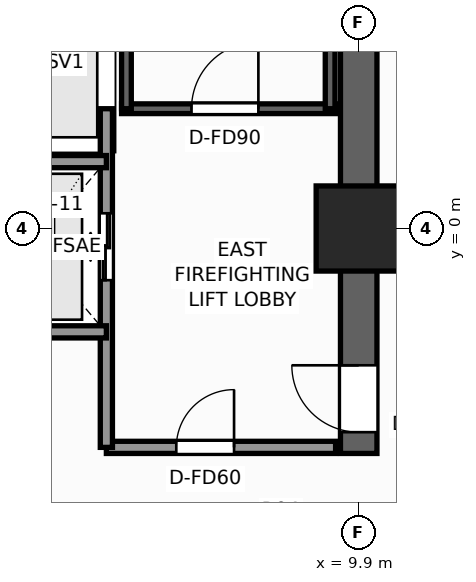
"""IFC4 building model, lengths in metres.
Left out: names, types, materials, properties, quantities, classifications, styles, units other than length and angle.
Written with IfcOpenShell. Run it as: python <this file> out.ifc"""

import sys

from ifc_helpers import new_model, si_unit, direction, frame, frame_2d, origin, origin_2d, place, context, subcontext, project, spatial, rectangle, extrude, element, fill, save


model = new_model("IFC4")
c1 = context("Model", 3, precision=1e-05, world=origin(), true_north=direction((0.0, 1.0)))
c2 = subcontext(c1, "Body", "Model", "MODEL_VIEW")
j1 = project(units=[si_unit("LENGTHUNIT", "METRE"), si_unit("PLANEANGLEUNIT", "RADIAN")], contexts=[c1])
p1 = place(None, origin())
s1 = spatial("IfcSite", under=j1, at=p1, CompositionType="ELEMENT")
p2 = place(p1, origin())
s2 = spatial("IfcBuilding", under=s1, at=p2, CompositionType="ELEMENT")
p3 = place(p2, frame((0.0, 0.0, 53.5)))
s3 = spatial("IfcBuildingStorey", under=s2, at=p3, CompositionType="ELEMENT", Elevation=53.5)
p4 = place(p3, frame((9.9, -3.7, 0.0), z_axis=(0.0, 0.0, 1.0), x_axis=(0.0, 1.0, 0.0)))
e1 = element("IfcWall", 1, at=p4, inside=s3, PredefinedType="SHEAR", context=c2, shape_type="SweptSolid", body=[
    extrude(rectangle(XDim=13.3, YDim=0.6, at=frame_2d((6.65, 0.0))), origin(), (0.0, 0.0, 1.0), 3.3),
])
p5 = place(p4, frame((0.35, 0.0, 0.0)))
e2 = element("IfcOpeningElement", 2, at=p5, cuts=e1, PredefinedType="OPENING", context=c2, shape_type="SweptSolid", body=[
    extrude(rectangle(XDim=1.1, YDim=2.2, at=frame_2d((0.55, 1.1))), frame((0.0, 0.31, 0.0), z_axis=(0.0, -1.0, 0.0), x_axis=(1.0, 0.0, 0.0)), (0.0, 0.0, 1.0), 0.62),
])
p6 = place(p3, frame((9.9, 0.0, 0.0), z_axis=(0.0, 0.0, 1.0), x_axis=(1.0, 0.0, 0.0)))
e3 = element("IfcColumn", 3, at=p6, inside=s3, PredefinedType="COLUMN", context=c2, shape_type="SweptSolid", body=[
    extrude(rectangle(XDim=1.4, YDim=1.4, at=origin_2d()), origin(), (0.0, 0.0, 1.0), 3.3),
])
p7 = place(p3, frame((6.0, 1.97, 0.0), z_axis=(0.0, 0.0, 1.0), x_axis=(1.0, 0.0, 0.0)))
e4 = element("IfcWall", 4, at=p7, inside=s3, PredefinedType="SHEAR", context=c2, shape_type="SweptSolid", body=[
    extrude(rectangle(XDim=3.52, YDim=0.16, at=frame_2d((1.76, 0.0))), origin(), (0.0, 0.0, 1.0), 3.3),
])
p8 = place(p7, frame((1.15, 0.0, 0.0)))
e5 = element("IfcOpeningElement", 5, at=p8, cuts=e4, PredefinedType="OPENING", context=c2, shape_type="SweptSolid", body=[
    extrude(rectangle(XDim=1.1, YDim=2.2, at=frame_2d((0.55, 1.1))), frame((0.0, 0.09, 0.0), z_axis=(0.0, -1.0, 0.0), x_axis=(1.0, 0.0, 0.0)), (0.0, 0.0, 1.0), 0.18),
])
for number, where, z_axis, x_axis in (
    (6, (6.08, 1.97, 0.0), (0.0, 0.0, 1.0), (0.0, 1.0, 0.0)),
    (7, (9.43, 1.97, 0.0), (0.0, 0.0, 1.0), (0.0, 1.0, 0.0)),
):
    element("IfcWall", number, at=place(p3, frame(where, z_axis=z_axis, x_axis=x_axis)), inside=s3, PredefinedType="SHEAR", context=c2, shape_type="SweptSolid", body=[
        extrude(rectangle(XDim=7.56, YDim=0.16, at=frame_2d((3.78, 0.0))), origin(), (0.0, 0.0, 1.0), 3.3),
    ])
p9 = place(p3, frame((5.75, -3.6, 0.0), z_axis=(0.0, 0.0, 1.0), x_axis=(1.0, 0.0, 0.0)))
e8 = element("IfcWall", 8, at=p9, inside=s3, PredefinedType="SOLIDWALL", context=c2, shape_type="SweptSolid", body=[
    extrude(rectangle(XDim=3.77, YDim=0.2, at=frame_2d((1.885, 0.0))), origin(), (0.0, 0.0, 1.0), 3.06),
])
p10 = place(p9, frame((1.15, 0.0, 0.0)))
e9 = element("IfcOpeningElement", 9, at=p10, cuts=e8, PredefinedType="OPENING", context=c2, shape_type="SweptSolid", body=[
    extrude(rectangle(XDim=0.95, YDim=2.06, at=frame_2d((0.475, 1.03))), frame((0.0, 0.11, 0.0), z_axis=(0.0, -1.0, 0.0), x_axis=(1.0, 0.0, 0.0)), (0.0, 0.0, 1.0), 0.22),
])
p11 = place(p3, frame((5.75, -3.6, 0.0), z_axis=(0.0, 0.0, 1.0), x_axis=(0.0, 1.0, 0.0)))
e10 = element("IfcWall", 10, at=p11, inside=s3, PredefinedType="SOLIDWALL", context=c2, shape_type="SweptSolid", body=[
    extrude(rectangle(XDim=5.57, YDim=0.2, at=frame_2d((2.785, 0.0))), origin(), (0.0, 0.0, 1.0), 3.06),
])
p12 = place(p11, frame((2.75, 0.0, 0.0)))
e11 = element("IfcOpeningElement", 11, at=p12, cuts=e10, PredefinedType="OPENING", context=c2, shape_type="SweptSolid", body=[
    extrude(rectangle(XDim=1.1, YDim=2.2, at=frame_2d((0.55, 1.1))), frame((0.0, 0.11, 0.0), z_axis=(0.0, -1.0, 0.0), x_axis=(1.0, 0.0, 0.0)), (0.0, 0.0, 1.0), 0.22),
])
for number, where, z_axis, x_axis in (
    (12, (3.35, -1.7, 0.0), (0.0, 0.0, 1.0), (1.0, 0.0, 0.0)),
    (13, (3.35, 1.1, 0.0), (0.0, 0.0, 1.0), (1.0, 0.0, 0.0)),
):
    element("IfcWall", number, at=place(p3, frame(where, z_axis=z_axis, x_axis=x_axis)), inside=s3, PredefinedType="SOLIDWALL", context=c2, shape_type="SweptSolid", body=[
        extrude(rectangle(XDim=2.4, YDim=0.2, at=frame_2d((1.2, 0.0))), origin(), (0.0, 0.0, 1.0), 3.06),
    ])
p13 = place(p8, origin())
e14 = element("IfcDoor", 14, at=p13, inside=s3, OperationType="SINGLE_SWING_RIGHT", PredefinedType="DOOR", context=c2, shape_type="SweptSolid", body=[
    extrude(rectangle(XDim=1.1, YDim=2.2, at=frame_2d((0.55, 1.1))), frame((0.0, 0.025, 0.0), z_axis=(0.0, -1.0, 0.0), x_axis=(1.0, 0.0, 0.0)), (0.0, 0.0, 1.0), 0.05),
])
fill(e5, e14)
p14 = place(p5, origin())
e15 = element("IfcDoor", 15, at=p14, inside=s3, OperationType="SINGLE_SWING_RIGHT", PredefinedType="DOOR", context=c2, shape_type="SweptSolid", body=[
    extrude(rectangle(XDim=1.1, YDim=2.2, at=frame_2d((0.55, 1.1))), frame((0.0, 0.025, 0.0), z_axis=(0.0, -1.0, 0.0), x_axis=(1.0, 0.0, 0.0)), (0.0, 0.0, 1.0), 0.05),
])
fill(e2, e15)
p15 = place(p12, origin())
e16 = element("IfcDoor", 16, at=p15, inside=s3, OperationType="DOUBLE_DOOR_SLIDING", PredefinedType="DOOR", context=c2, shape_type="SweptSolid", body=[
    extrude(rectangle(XDim=1.1, YDim=2.2, at=frame_2d((0.55, 1.1))), frame((0.0, 0.025, 0.0), z_axis=(0.0, -1.0, 0.0), x_axis=(1.0, 0.0, 0.0)), (0.0, 0.0, 1.0), 0.05),
])
fill(e11, e16)
p16 = place(p10, origin())
e17 = element("IfcDoor", 17, at=p16, inside=s3, OperationType="SINGLE_SWING_RIGHT", PredefinedType="DOOR", context=c2, shape_type="SweptSolid", body=[
    extrude(rectangle(XDim=0.95, YDim=2.06, at=frame_2d((0.475, 1.03))), frame((0.0, 0.025, 0.0), z_axis=(0.0, -1.0, 0.0), x_axis=(1.0, 0.0, 0.0)), (0.0, 0.0, 1.0), 0.05),
])
fill(e9, e17)
save(model, sys.argv[1])
